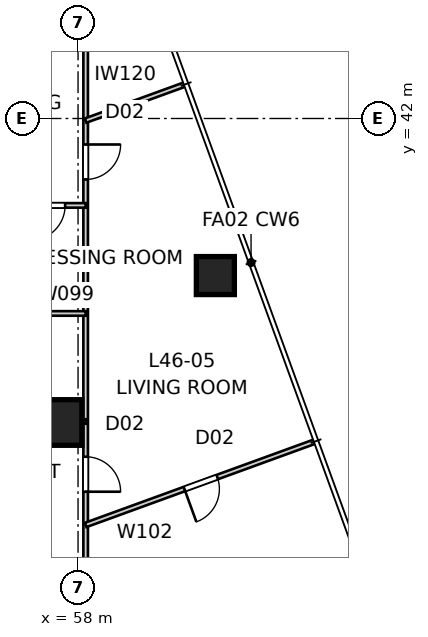
"""IFC4 building model, lengths in metres.
Left out: names, types, materials, properties, quantities, classifications, styles, units other than length and angle.
Written with IfcOpenShell. Run it as: python <this file> out.ifc"""

import sys

from ifc_helpers import new_model, si_unit, direction, frame, frame_2d, origin, origin_2d, place, context, subcontext, project, spatial, rectangle, extrude, element, fill, save


model = new_model("IFC4")
c1 = context("Model", 3, precision=1e-05, world=origin(), true_north=direction((0.0, 1.0)))
c2 = subcontext(c1, "Body", "Model", "MODEL_VIEW")
j1 = project(units=[si_unit("LENGTHUNIT", "METRE"), si_unit("PLANEANGLEUNIT", "RADIAN")], contexts=[c1])
p1 = place(None, origin())
s1 = spatial("IfcSite", under=j1, at=p1, CompositionType="ELEMENT")
p2 = place(p1, origin())
s2 = spatial("IfcBuilding", under=s1, at=p2, CompositionType="ELEMENT")
p3 = place(p2, frame((0.0, 0.0, 167.6)))
s3 = spatial("IfcBuildingStorey", under=s2, at=p3, CompositionType="ELEMENT", Elevation=167.6)
p4 = place(p3, frame((61.613, 37.866, 0.0), z_axis=(0.0, 0.0, 1.0), x_axis=(1.0, 0.0, 0.0)))
e1 = element("IfcColumn", 1, at=p4, inside=s3, PredefinedType="COLUMN", context=c2, shape_type="SweptSolid", body=[
    extrude(rectangle(XDim=1.0, YDim=1.0, at=origin_2d()), origin(), (0.0, 0.0, 1.0), 3.2),
])
p5 = place(p3, frame((57.5, 34.0, 0.0), z_axis=(0.0, 0.0, 1.0), x_axis=(1.0, 0.0, 0.0)))
e2 = element("IfcColumn", 2, at=p5, inside=s3, PredefinedType="COLUMN", context=c2, shape_type="SweptSolid", body=[
    extrude(rectangle(XDim=1.2, YDim=1.2, at=origin_2d()), origin(), (0.0, 0.0, 1.0), 3.4),
])
p6 = place(p3, frame((58.2, 47.266, 0.0), z_axis=(0.0, 0.0, 1.0), x_axis=(0.0, -1.0, 0.0)))
e3 = element("IfcWall", 3, at=p6, inside=s3, PredefinedType="PARTITIONING", context=c2, shape_type="SweptSolid", body=[
    extrude(rectangle(XDim=36.14, YDim=0.12, at=frame_2d((18.07, 0.0))), origin(), (0.0, 0.0, 1.0), 3.2),
])
p7 = place(p6, frame((2.227, 0.0, 0.0)))
e4 = element("IfcOpeningElement", 4, at=p7, cuts=e3, PredefinedType="OPENING", context=c2, shape_type="SweptSolid", body=[
    extrude(rectangle(XDim=0.92, YDim=2.34, at=frame_2d((0.46, 1.17))), frame((0.0, 0.07, 0.0), z_axis=(0.0, -1.0, 0.0), x_axis=(1.0, 0.0, 0.0)), (0.0, 0.0, 1.0), 0.14),
])
p8 = place(p6, frame((5.95, 0.0, 0.0)))
e5 = element("IfcOpeningElement", 5, at=p8, cuts=e3, PredefinedType="OPENING", context=c2, shape_type="SweptSolid", body=[
    extrude(rectangle(XDim=0.92, YDim=2.34, at=frame_2d((0.46, 1.17))), frame((0.0, 0.07, 0.0), z_axis=(0.0, -1.0, 0.0), x_axis=(1.0, 0.0, 0.0)), (0.0, 0.0, 1.0), 0.14),
])
p9 = place(p6, frame((29.769, 0.0, 0.0)))
e6 = element("IfcOpeningElement", 6, at=p9, cuts=e3, PredefinedType="OPENING", context=c2, shape_type="SweptSolid", body=[
    extrude(rectangle(XDim=0.92, YDim=2.34, at=frame_2d((0.46, 1.17))), frame((0.0, 0.07, 0.0), z_axis=(0.0, -1.0, 0.0), x_axis=(1.0, 0.0, 0.0)), (0.0, 0.0, 1.0), 0.14),
])
p10 = place(p6, frame((14.168, 0.0, 0.0)))
e7 = element("IfcOpeningElement", 7, at=p10, cuts=e3, PredefinedType="OPENING", context=c2, shape_type="SweptSolid", body=[
    extrude(rectangle(XDim=0.92, YDim=2.34, at=frame_2d((0.46, 1.17))), frame((0.0, 0.07, 0.0), z_axis=(0.0, -1.0, 0.0), x_axis=(1.0, 0.0, 0.0)), (0.0, 0.0, 1.0), 0.14),
])
p11 = place(p6, frame((33.434, 0.0, 0.0)))
e8 = element("IfcOpeningElement", 8, at=p11, cuts=e3, PredefinedType="OPENING", context=c2, shape_type="SweptSolid", body=[
    extrude(rectangle(XDim=0.92, YDim=2.34, at=frame_2d((0.46, 1.17))), frame((0.0, 0.07, 0.0), z_axis=(0.0, -1.0, 0.0), x_axis=(1.0, 0.0, 0.0)), (0.0, 0.0, 1.0), 0.14),
])
p12 = place(p3, frame((58.2, 39.713, 0.0), z_axis=(0.0, 0.0, 1.0), x_axis=(-1.0, 0.0, 0.0)))
e9 = element("IfcWall", 9, at=p12, inside=s3, PredefinedType="PARTITIONING", context=c2, shape_type="SweptSolid", body=[
    extrude(rectangle(XDim=4.4, YDim=0.12, at=frame_2d((2.2, 0.0))), origin(), (0.0, 0.0, 1.0), 3.2),
])
p13 = place(p12, frame((0.54, 0.0, 0.0)))
e10 = element("IfcOpeningElement", 10, at=p13, cuts=e9, PredefinedType="OPENING", context=c2, shape_type="SweptSolid", body=[
    extrude(rectangle(XDim=0.92, YDim=2.34, at=frame_2d((0.46, 1.17))), frame((0.0, 0.07, 0.0), z_axis=(0.0, -1.0, 0.0), x_axis=(1.0, 0.0, 0.0)), (0.0, 0.0, 1.0), 0.14),
])
p14 = place(p3, frame((53.8, 36.87, 0.0), z_axis=(0.0, 0.0, 1.0), x_axis=(1.0, 0.0, 0.0)))
e11 = element("IfcWall", 11, at=p14, inside=s3, PredefinedType="PARTITIONING", context=c2, shape_type="SweptSolid", body=[
    extrude(rectangle(XDim=4.4, YDim=0.12, at=frame_2d((2.2, 0.0))), origin(), (0.0, 0.0, 1.0), 3.2),
])
p15 = place(p14, frame((1.72, 0.0, 0.0)))
e12 = element("IfcOpeningElement", 12, at=p15, cuts=e11, PredefinedType="OPENING", context=c2, shape_type="SweptSolid", body=[
    extrude(rectangle(XDim=0.96, YDim=2.1, at=frame_2d((0.48, 1.05))), frame((0.0, 0.07, 0.0), z_axis=(0.0, -1.0, 0.0), x_axis=(1.0, 0.0, 0.0)), (0.0, 0.0, 1.0), 0.14),
])
p16 = place(p3, frame((58.2, 34.027, 0.0), z_axis=(0.0, 0.0, 1.0), x_axis=(-1.0, 0.0, 0.0)))
e13 = element("IfcWall", 13, at=p16, inside=s3, PredefinedType="PARTITIONING", context=c2, shape_type="SweptSolid", body=[
    extrude(rectangle(XDim=4.4, YDim=0.12, at=frame_2d((2.2, 0.0))), origin(), (0.0, 0.0, 1.0), 3.2),
])
p17 = place(p3, frame((64.225, 33.496, 0.0), z_axis=(0.0, 0.0, 1.0), x_axis=(-0.939697777766, -0.342005974306, 0.0)))
e14 = element("IfcWall", 14, at=p17, inside=s3, PredefinedType="PARTITIONING", context=c2, shape_type="SweptSolid", body=[
    extrude(rectangle(XDim=6.412, YDim=0.12, at=frame_2d((3.206, 0.0))), origin(), (0.0, 0.0, 1.0), 3.2),
])
p18 = place(p17, frame((2.726, 0.0, 0.0)))
e15 = element("IfcOpeningElement", 15, at=p18, cuts=e14, PredefinedType="OPENING", context=c2, shape_type="SweptSolid", body=[
    extrude(rectangle(XDim=0.92, YDim=2.34, at=frame_2d((0.46, 1.17))), frame((0.0, 0.07, 0.0), z_axis=(0.0, -1.0, 0.0), x_axis=(1.0, 0.0, 0.0)), (0.0, 0.0, 1.0), 0.14),
])
p19 = place(p3, frame((58.2, 41.945, 0.0), z_axis=(0.0, 0.0, 1.0), x_axis=(0.939680234176, 0.34205417334, 0.0)))
e16 = element("IfcWall", 16, at=p19, inside=s3, PredefinedType="PARTITIONING", context=c2, shape_type="SweptSolid", body=[
    extrude(rectangle(XDim=2.772, YDim=0.12, at=frame_2d((1.386, 0.0))), origin(), (0.0, 0.0, 1.0), 3.2),
])
p20 = place(p13, origin())
e17 = element("IfcDoor", 17, at=p20, inside=s3, OperationType="SINGLE_SWING_RIGHT", PredefinedType="DOOR", context=c2, shape_type="SweptSolid", body=[
    extrude(rectangle(XDim=0.92, YDim=2.34, at=frame_2d((0.46, 1.17))), frame((0.0, 0.025, 0.0), z_axis=(0.0, -1.0, 0.0), x_axis=(1.0, 0.0, 0.0)), (0.0, 0.0, 1.0), 0.05),
])
fill(e10, e17)
p21 = place(p8, origin())
e18 = element("IfcDoor", 18, at=p21, inside=s3, OperationType="SINGLE_SWING_LEFT", PredefinedType="DOOR", context=c2, shape_type="SweptSolid", body=[
    extrude(rectangle(XDim=0.92, YDim=2.34, at=frame_2d((0.46, 1.17))), frame((0.0, 0.025, 0.0), z_axis=(0.0, -1.0, 0.0), x_axis=(1.0, 0.0, 0.0)), (0.0, 0.0, 1.0), 0.05),
])
fill(e5, e18)
p22 = place(p18, origin())
e19 = element("IfcDoor", 19, at=p22, inside=s3, OperationType="SINGLE_SWING_RIGHT", PredefinedType="DOOR", context=c2, shape_type="SweptSolid", body=[
    extrude(rectangle(XDim=0.92, YDim=2.34, at=frame_2d((0.46, 1.17))), frame((0.0, 0.025, 0.0), z_axis=(0.0, -1.0, 0.0), x_axis=(1.0, 0.0, 0.0)), (0.0, 0.0, 1.0), 0.05),
])
fill(e15, e19)
p23 = place(p10, origin())
e20 = element("IfcDoor", 20, at=p23, inside=s3, OperationType="SINGLE_SWING_RIGHT", PredefinedType="DOOR", context=c2, shape_type="SweptSolid", body=[
    extrude(rectangle(XDim=0.92, YDim=2.34, at=frame_2d((0.46, 1.17))), frame((0.0, 0.025, 0.0), z_axis=(0.0, -1.0, 0.0), x_axis=(1.0, 0.0, 0.0)), (0.0, 0.0, 1.0), 0.05),
])
fill(e7, e20)
save(model, sys.argv[1])
